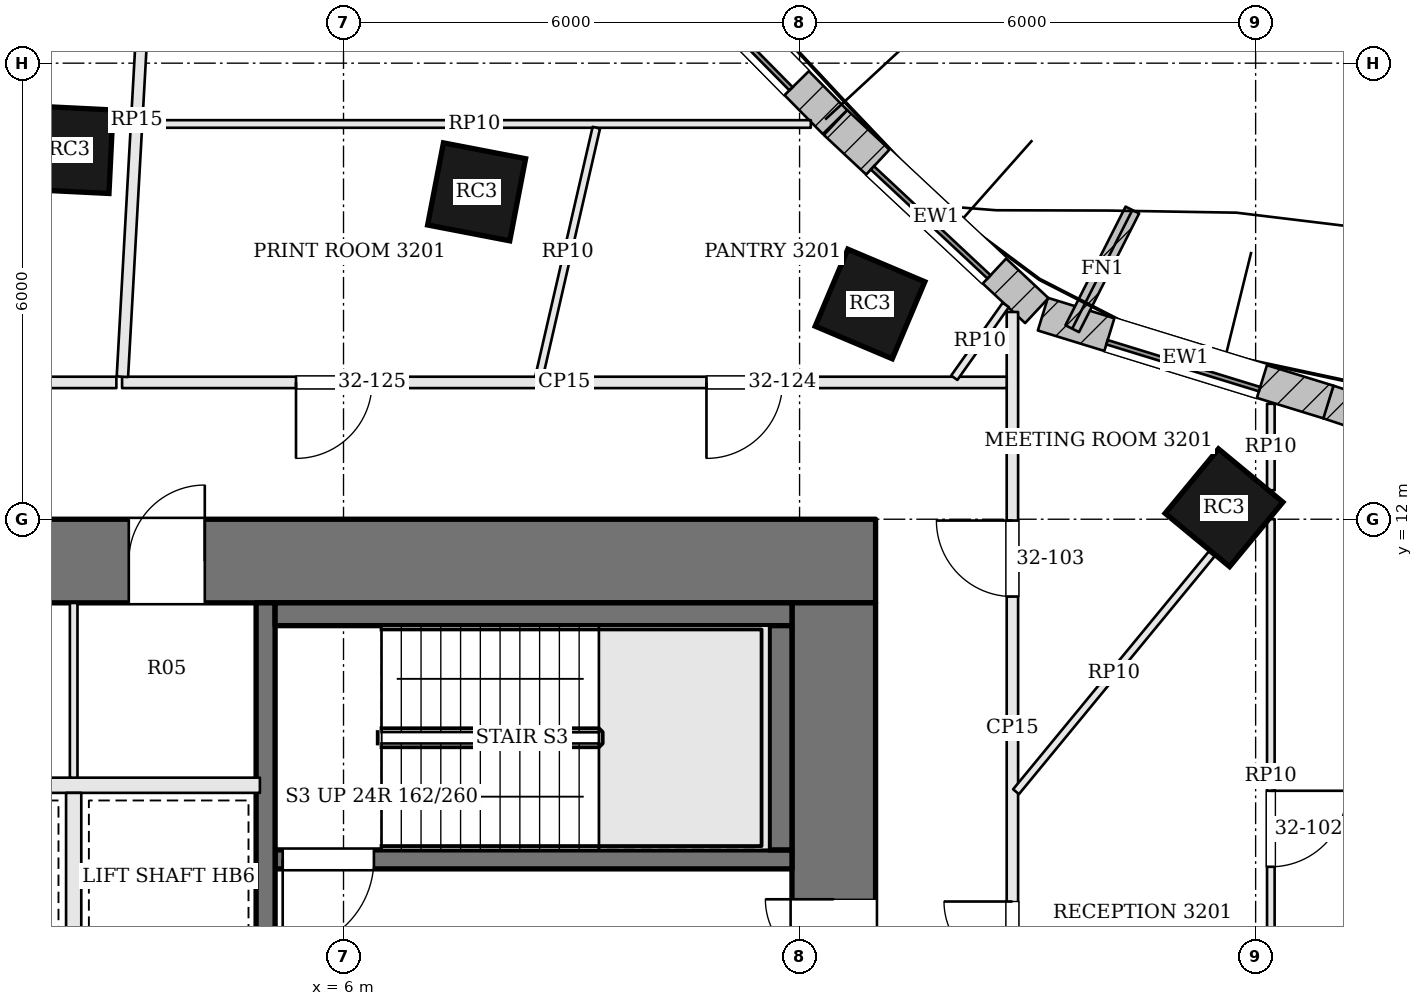
"""IFC4 building model, lengths in metres.
Left out: names, types, materials, properties, quantities, classifications, styles, units other than length and angle.
Written with IfcOpenShell. Run it as: python <this file> out.ifc"""

import sys

from ifc_helpers import new_model, si_unit, direction, frame, frame_2d, origin, origin_2d, place, context, subcontext, project, spatial, rectangle, extrude, element, fill, save


model = new_model("IFC4")
c1 = context("Model", 3, precision=1e-05, world=origin(), true_north=direction((0.0, 1.0)))
c2 = subcontext(c1, "Body", "Model", "MODEL_VIEW")
j1 = project(units=[si_unit("LENGTHUNIT", "METRE"), si_unit("PLANEANGLEUNIT", "RADIAN")], contexts=[c1])
p1 = place(None, origin())
s1 = spatial("IfcSite", under=j1, at=p1, CompositionType="ELEMENT")
p2 = place(p1, origin())
s2 = spatial("IfcBuilding", under=s1, at=p2, CompositionType="ELEMENT")
p3 = place(p2, frame((0.0, 0.0, 134.4)))
s3 = spatial("IfcBuildingStorey", under=s2, at=p3, CompositionType="ELEMENT", Elevation=134.4)
p4 = place(p3, frame((-13.0, 11.45, 0.0), z_axis=(0.0, 0.0, 1.0), x_axis=(1.0, 0.0, 0.0)))
e1 = element("IfcWall", 1, at=p4, inside=s3, PredefinedType="SHEAR", context=c2, shape_type="SweptSolid", body=[
    extrude(rectangle(XDim=26.0, YDim=1.1, at=frame_2d((13.0, 0.0))), origin(), (0.0, 0.0, 1.0), 3.9),
])
p5 = place(p4, frame((8.975, 0.0, 0.0)))
e2 = element("IfcOpeningElement", 2, at=p5, cuts=e1, PredefinedType="OPENING", context=c2, shape_type="SweptSolid", body=[
    extrude(rectangle(XDim=0.7, YDim=2.1, at=frame_2d((0.35, 1.05))), frame((0.0, 0.56, 0.0), z_axis=(0.0, -1.0, 0.0), x_axis=(1.0, 0.0, 0.0)), (0.0, 0.0, 1.0), 1.12),
])
p6 = place(p4, frame((11.425, 0.0, 0.0)))
e3 = element("IfcOpeningElement", 3, at=p6, cuts=e1, PredefinedType="OPENING", context=c2, shape_type="SweptSolid", body=[
    extrude(rectangle(XDim=0.7, YDim=2.1, at=frame_2d((0.35, 1.05))), frame((0.0, 0.56, 0.0), z_axis=(0.0, -1.0, 0.0), x_axis=(1.0, 0.0, 0.0)), (0.0, 0.0, 1.0), 1.12),
])
p7 = place(p4, frame((13.725, 0.0, 0.0)))
e4 = element("IfcOpeningElement", 4, at=p7, cuts=e1, PredefinedType="OPENING", context=c2, shape_type="SweptSolid", body=[
    extrude(rectangle(XDim=1.0, YDim=2.1, at=frame_2d((0.5, 1.05))), frame((0.0, 0.56, 0.0), z_axis=(0.0, -1.0, 0.0), x_axis=(1.0, 0.0, 0.0)), (0.0, 0.0, 1.0), 1.12),
])
p8 = place(p4, frame((16.175, 0.0, 0.0)))
e5 = element("IfcOpeningElement", 5, at=p8, cuts=e1, PredefinedType="OPENING", context=c2, shape_type="SweptSolid", body=[
    extrude(rectangle(XDim=1.0, YDim=2.1, at=frame_2d((0.5, 1.05))), frame((0.0, 0.56, 0.0), z_axis=(0.0, -1.0, 0.0), x_axis=(1.0, 0.0, 0.0)), (0.0, 0.0, 1.0), 1.12),
])
p9 = place(p3, frame((12.45, -1.9, 0.0), z_axis=(0.0, 0.0, 1.0), x_axis=(0.0, 1.0, 0.0)))
e6 = element("IfcWall", 6, at=p9, inside=s3, PredefinedType="SHEAR", context=c2, shape_type="SweptSolid", body=[
    extrude(rectangle(XDim=12.8, YDim=1.1, at=frame_2d((6.4, 0.0))), origin(), (0.0, 0.0, 1.0), 3.9),
])
p10 = place(p9, frame((7.1, 0.0, 0.0)))
e7 = element("IfcOpeningElement", 7, at=p10, cuts=e6, PredefinedType="OPENING", context=c2, shape_type="SweptSolid", body=[
    extrude(rectangle(XDim=1.8, YDim=2.1, at=frame_2d((0.9, 1.05))), frame((0.0, 0.56, 0.0), z_axis=(0.0, -1.0, 0.0), x_axis=(1.0, 0.0, 0.0)), (0.0, 0.0, 1.0), 1.12),
])
for number, where, z_axis, x_axis in (
    (8, (17.584, 12.151, 0.0), (0.0, 0.0, 1.0), (-0.771, 0.637, 0.0)),
    (9, (12.927, 14.832, 0.0), (0.0, 0.0, 1.0), (-0.921, 0.389, 0.0)),
    (10, (7.751, 16.307, 0.0), (0.0, 0.0, 1.0), (-0.982, 0.189, 0.0)),
    (11, (2.392, 16.862, 0.0), (0.0, 0.0, 1.0), (-0.999, 0.049, 0.0)),
):
    element("IfcColumn", number, at=place(p3, frame(where, z_axis=z_axis, x_axis=x_axis)), inside=s3, PredefinedType="COLUMN", context=c2, shape_type="SweptSolid", body=[
        extrude(rectangle(XDim=1.1, YDim=1.1, at=origin_2d()), origin(), (0.0, 0.0, 1.0), 3.9),
    ])
p11 = place(p3, frame((23.77, 11.938, 0.0), z_axis=(0.0, 0.0, 1.0), x_axis=(-0.948673679101, 0.316256621402, 0.0)))
e12 = element("IfcWall", 12, at=p11, inside=s3, PredefinedType="SOLIDWALL", context=c2, shape_type="SweptSolid", body=[
    extrude(rectangle(XDim=5.076, YDim=0.45, at=frame_2d((2.538, 0.0))), origin(), (0.0, 0.0, 1.0), 3.7),
])
p12 = place(p11, frame((1.488, 0.0, 0.9)))
e13 = element("IfcOpeningElement", 13, at=p12, cuts=e12, PredefinedType="OPENING", context=c2, shape_type="SweptSolid", body=[
    extrude(rectangle(XDim=2.1, YDim=2.3, at=frame_2d((1.05, 1.15))), frame((0.0, 0.235, 0.0), z_axis=(0.0, -1.0, 0.0), x_axis=(1.0, 0.0, 0.0)), (0.0, 0.0, 1.0), 0.47),
])
p13 = place(p3, frame((18.958, 13.542, 0.0), z_axis=(0.0, 0.0, 1.0), x_axis=(-0.955792437529, 0.294042201668, 0.0)))
e14 = element("IfcWall", 14, at=p13, inside=s3, PredefinedType="SOLIDWALL", context=c2, shape_type="SweptSolid", body=[
    extrude(rectangle(XDim=3.931, YDim=0.45, at=frame_2d((1.965, 0.0))), origin(), (0.0, 0.0, 1.0), 3.7),
])
p14 = place(p13, frame((0.915, 0.0, 0.9)))
e15 = element("IfcOpeningElement", 15, at=p14, cuts=e14, PredefinedType="OPENING", context=c2, shape_type="SweptSolid", body=[
    extrude(rectangle(XDim=2.1, YDim=2.3, at=frame_2d((1.05, 1.15))), frame((0.0, 0.235, 0.0), z_axis=(0.0, -1.0, 0.0), x_axis=(1.0, 0.0, 0.0)), (0.0, 0.0, 1.0), 0.47),
])
p15 = place(p3, frame((15.121, 14.745, 0.0), z_axis=(0.0, 0.0, 1.0), x_axis=(-0.730618259172, 0.68278617397, 0.0)))
e16 = element("IfcWall", 16, at=p15, inside=s3, PredefinedType="SOLIDWALL", context=c2, shape_type="SweptSolid", body=[
    extrude(rectangle(XDim=3.624, YDim=0.45, at=frame_2d((1.812, 0.0))), origin(), (0.0, 0.0, 1.0), 3.7),
])
p16 = place(p15, frame((0.762, 0.0, 0.9)))
e17 = element("IfcOpeningElement", 17, at=p16, cuts=e16, PredefinedType="OPENING", context=c2, shape_type="SweptSolid", body=[
    extrude(rectangle(XDim=2.1, YDim=2.3, at=frame_2d((1.05, 1.15))), frame((0.0, 0.235, 0.0), z_axis=(0.0, -1.0, 0.0), x_axis=(1.0, 0.0, 0.0)), (0.0, 0.0, 1.0), 0.47),
])
p17 = place(p3, frame((12.466, 17.226, 0.0), z_axis=(0.0, 0.0, 1.0), x_axis=(-0.701875966769, 0.712299183821, 0.0)))
e18 = element("IfcWall", 18, at=p17, inside=s3, PredefinedType="SOLIDWALL", context=c2, shape_type="SweptSolid", body=[
    extrude(rectangle(XDim=3.537, YDim=0.45, at=frame_2d((1.769, 0.0))), origin(), (0.0, 0.0, 1.0), 3.7),
])
p18 = place(p17, frame((0.718, 0.0, 0.9)))
e19 = element("IfcOpeningElement", 19, at=p18, cuts=e18, PredefinedType="OPENING", context=c2, shape_type="SweptSolid", body=[
    extrude(rectangle(XDim=2.1, YDim=2.3, at=frame_2d((1.05, 1.15))), frame((0.0, 0.235, 0.0), z_axis=(0.0, -1.0, 0.0), x_axis=(1.0, 0.0, 0.0)), (0.0, 0.0, 1.0), 0.47),
])
p19 = place(p3, frame((15.587, 14.507, 0.0), z_axis=(0.0, 0.0, 1.0), x_axis=(0.452117231361, 0.89195852432, 0.0)))
e20 = element("IfcWall", 20, at=p19, inside=s3, PredefinedType="SOLIDWALL", context=c2, shape_type="SweptSolid", body=[
    extrude(rectangle(XDim=1.75, YDim=0.2, at=frame_2d((0.875, 0.0))), origin(), (0.0, 0.0, 1.0), 3.7),
])
p20 = place(p3, frame((11.9, 7.525, 0.0), z_axis=(0.0, 0.0, 1.0), x_axis=(-1.0, 0.0, 0.0)))
e21 = element("IfcWall", 21, at=p20, inside=s3, PredefinedType="SOLIDWALL", context=c2, shape_type="SweptSolid", body=[
    extrude(rectangle(XDim=6.8, YDim=0.25, at=frame_2d((3.4, 0.0))), origin(), (0.0, 0.0, 1.0), 3.7),
])
p21 = place(p20, frame((5.5, 0.0, 0.0)))
e22 = element("IfcOpeningElement", 22, at=p21, cuts=e21, PredefinedType="OPENING", context=c2, shape_type="SweptSolid", body=[
    extrude(rectangle(XDim=1.2, YDim=2.1, at=frame_2d((0.6, 1.05))), frame((0.0, 0.135, 0.0), z_axis=(0.0, -1.0, 0.0), x_axis=(1.0, 0.0, 0.0)), (0.0, 0.0, 1.0), 0.27),
])
p22 = place(p3, frame((4.975, 10.9, 0.0), z_axis=(0.0, 0.0, 1.0), x_axis=(0.0, -1.0, 0.0)))
e23 = element("IfcWall", 23, at=p22, inside=s3, PredefinedType="SOLIDWALL", context=c2, shape_type="SweptSolid", body=[
    extrude(rectangle(XDim=12.8, YDim=0.25, at=frame_2d((6.4, 0.0))), origin(), (0.0, 0.0, 1.0), 3.7),
])
p23 = place(p22, frame((4.95, 0.0, 0.0)))
e24 = element("IfcOpeningElement", 24, at=p23, cuts=e23, PredefinedType="OPENING", context=c2, shape_type="SweptSolid", body=[
    extrude(rectangle(XDim=1.2, YDim=2.1, at=frame_2d((0.6, 1.05))), frame((0.0, 0.135, 0.0), z_axis=(0.0, -1.0, 0.0), x_axis=(1.0, 0.0, 0.0)), (0.0, 0.0, 1.0), 0.27),
])
p24 = place(p3, frame((11.9, 10.75, 0.0), z_axis=(0.0, 0.0, 1.0), x_axis=(-1.0, 0.0, 0.0)))
e25 = element("IfcWall", 25, at=p24, inside=s3, PredefinedType="SOLIDWALL", context=c2, shape_type="SweptSolid", body=[
    extrude(rectangle(XDim=6.8, YDim=0.3, at=frame_2d((3.4, 0.0))), origin(), (0.0, 0.0, 1.0), 3.7),
])
p25 = place(p3, frame((11.75, 10.6, 0.0), z_axis=(0.0, 0.0, 1.0), x_axis=(0.0, -1.0, 0.0)))
e26 = element("IfcWall", 26, at=p25, inside=s3, PredefinedType="SOLIDWALL", context=c2, shape_type="SweptSolid", body=[
    extrude(rectangle(XDim=2.95, YDim=0.3, at=frame_2d((1.475, 0.0))), origin(), (0.0, 0.0, 1.0), 3.7),
])
p26 = place(p3, frame((-4.9, 8.5, 0.0), z_axis=(0.0, 0.0, 1.0), x_axis=(1.0, 0.0, 0.0)))
e27 = element("IfcWall", 27, at=p26, inside=s3, PredefinedType="SOLIDWALL", context=c2, shape_type="SweptSolid", body=[
    extrude(rectangle(XDim=9.8, YDim=0.2, at=frame_2d((4.9, 0.0))), origin(), (0.0, 0.0, 1.0), 3.7),
])
p27 = place(p3, frame((2.45, 6.2, 0.0), z_axis=(0.0, 0.0, 1.0), x_axis=(0.0, 1.0, 0.0)))
e28 = element("IfcWall", 28, at=p27, inside=s3, PredefinedType="SOLIDWALL", context=c2, shape_type="SweptSolid", body=[
    extrude(rectangle(XDim=2.2, YDim=0.2, at=frame_2d((1.1, 0.0))), origin(), (0.0, 0.0, 1.0), 3.7),
])
p28 = place(p3, frame((2.45, 8.6, 0.0), z_axis=(0.0, 0.0, 1.0), x_axis=(0.0, 1.0, 0.0)))
e29 = element("IfcWall", 29, at=p28, inside=s3, PredefinedType="PARTITIONING", context=c2, shape_type="SweptSolid", body=[
    extrude(rectangle(XDim=2.3, YDim=0.1, at=frame_2d((1.15, 0.0))), origin(), (0.0, 0.0, 1.0), 3.7),
])
p29 = place(p3, frame((14.8, 3.784, 0.0), z_axis=(0.0, 0.0, 1.0), x_axis=(0.0, 1.0, 0.0)))
e30 = element("IfcWall", 30, at=p29, inside=s3, PredefinedType="PARTITIONING", context=c2, shape_type="SweptSolid", body=[
    extrude(rectangle(XDim=10.943, YDim=0.15, at=frame_2d((5.472, 0.0))), origin(), (0.0, 0.0, 1.0), 3.198),
])
p30 = place(p29, frame((1.387, 0.0, 0.0)))
e31 = element("IfcOpeningElement", 31, at=p30, cuts=e30, PredefinedType="OPENING", context=c2, shape_type="SweptSolid", body=[
    extrude(rectangle(XDim=1.8, YDim=2.1, at=frame_2d((0.9, 1.05))), frame((0.0, 0.085, 0.0), z_axis=(0.0, -1.0, 0.0), x_axis=(1.0, 0.0, 0.0)), (0.0, 0.0, 1.0), 0.17),
])
p31 = place(p29, frame((7.199, 0.0, 0.0)))
e32 = element("IfcOpeningElement", 32, at=p31, cuts=e30, PredefinedType="OPENING", context=c2, shape_type="SweptSolid", body=[
    extrude(rectangle(XDim=1.0, YDim=2.4, at=frame_2d((0.5, 1.2))), frame((0.0, 0.085, 0.0), z_axis=(0.0, -1.0, 0.0), x_axis=(1.0, 0.0, 0.0)), (0.0, 0.0, 1.0), 0.17),
])
p32 = place(p3, frame((14.725, 13.8, 0.0), z_axis=(0.0, 0.0, 1.0), x_axis=(-1.0, 0.0, 0.0)))
e33 = element("IfcWall", 33, at=p32, inside=s3, PredefinedType="PARTITIONING", context=c2, shape_type="SweptSolid", body=[
    extrude(rectangle(XDim=11.638, YDim=0.15, at=frame_2d((5.819, 0.0))), origin(), (0.0, 0.0, 1.0), 3.198),
])
p33 = place(p32, frame((2.95, 0.0, 0.0)))
e34 = element("IfcOpeningElement", 34, at=p33, cuts=e33, PredefinedType="OPENING", context=c2, shape_type="SweptSolid", body=[
    extrude(rectangle(XDim=1.0, YDim=2.1, at=frame_2d((0.5, 1.05))), frame((0.0, 0.085, 0.0), z_axis=(0.0, -1.0, 0.0), x_axis=(1.0, 0.0, 0.0)), (0.0, 0.0, 1.0), 0.17),
])
p34 = place(p32, frame((8.35, 0.0, 0.0)))
e35 = element("IfcOpeningElement", 35, at=p34, cuts=e33, PredefinedType="OPENING", context=c2, shape_type="SweptSolid", body=[
    extrude(rectangle(XDim=1.0, YDim=2.1, at=frame_2d((0.5, 1.05))), frame((0.0, 0.085, 0.0), z_axis=(0.0, -1.0, 0.0), x_axis=(1.0, 0.0, 0.0)), (0.0, 0.0, 1.0), 0.17),
])
p35 = place(p3, frame((25.739, 8.408, 0.0), z_axis=(0.0, 0.0, 1.0), x_axis=(-0.921062306608, -0.389415237692, 0.0)))
e36 = element("IfcWall", 36, at=p35, inside=s3, PredefinedType="PARTITIONING", context=c2, shape_type="SweptSolid", body=[
    extrude(rectangle(XDim=11.801, YDim=0.15, at=frame_2d((5.9, 0.0))), origin(), (0.0, 0.0, 1.0), 3.198),
])
p36 = place(p3, frame((3.47, 20.638, 0.0), z_axis=(0.0, 0.0, 1.0), x_axis=(-0.056008975247, -0.998430265312, 0.0)))
e37 = element("IfcWall", 37, at=p36, inside=s3, PredefinedType="PARTITIONING", context=c2, shape_type="SweptSolid", body=[
    extrude(rectangle(XDim=6.774, YDim=0.15, at=frame_2d((3.387, 0.0))), origin(), (0.0, 0.0, 1.0), 3.198),
])
p37 = place(p3, frame((3.012, 13.8, 0.0), z_axis=(0.0, 0.0, 1.0), x_axis=(-1.0, 0.0, 0.0)))
e38 = element("IfcWall", 38, at=p37, inside=s3, PredefinedType="PARTITIONING", context=c2, shape_type="SweptSolid", body=[
    extrude(rectangle(XDim=17.812, YDim=0.15, at=frame_2d((8.906, 0.0))), origin(), (0.0, 0.0, 1.0), 3.198),
])
p38 = place(p37, frame((3.342, 0.0, 0.0)))
e39 = element("IfcOpeningElement", 39, at=p38, cuts=e38, PredefinedType="OPENING", context=c2, shape_type="SweptSolid", body=[
    extrude(rectangle(XDim=1.8, YDim=2.1, at=frame_2d((0.9, 1.05))), frame((0.0, 0.085, 0.0), z_axis=(0.0, -1.0, 0.0), x_axis=(1.0, 0.0, 0.0)), (0.0, 0.0, 1.0), 0.17),
])
p39 = place(p37, frame((9.659, 0.0, 0.0)))
e40 = element("IfcOpeningElement", 40, at=p39, cuts=e38, PredefinedType="OPENING", context=c2, shape_type="SweptSolid", body=[
    extrude(rectangle(XDim=1.0, YDim=2.4, at=frame_2d((0.5, 1.2))), frame((0.0, 0.085, 0.0), z_axis=(0.0, -1.0, 0.0), x_axis=(1.0, 0.0, 0.0)), (0.0, 0.0, 1.0), 0.17),
])
p40 = place(p37, frame((14.25, 0.0, 0.0)))
e41 = element("IfcOpeningElement", 41, at=p40, cuts=e38, PredefinedType="OPENING", context=c2, shape_type="SweptSolid", body=[
    extrude(rectangle(XDim=1.0, YDim=2.1, at=frame_2d((0.5, 1.05))), frame((0.0, 0.085, 0.0), z_axis=(0.0, -1.0, 0.0), x_axis=(1.0, 0.0, 0.0)), (0.0, 0.0, 1.0), 0.17),
])
p41 = place(p3, frame((3.298, 17.2, 0.0), z_axis=(0.0, 0.0, 1.0), x_axis=(1.0, 0.0, 0.0)))
e42 = element("IfcWall", 42, at=p41, inside=s3, PredefinedType="PARTITIONING", context=c2, shape_type="SweptSolid", body=[
    extrude(rectangle(XDim=8.85, YDim=0.1, at=frame_2d((4.425, 0.0))), origin(), (0.0, 0.0, 1.0), 3.184),
])
p42 = place(p3, frame((18.2, 13.519, 0.0), z_axis=(0.0, 0.0, 1.0), x_axis=(0.0, -1.0, 0.0)))
e43 = element("IfcWall", 43, at=p42, inside=s3, PredefinedType="PARTITIONING", context=c2, shape_type="SweptSolid", body=[
    extrude(rectangle(XDim=1.138, YDim=0.1, at=frame_2d((0.569, 0.0))), origin(), (0.0, 0.0, 1.0), 3.184),
])
p43 = place(p3, frame((18.2, 12.001, 0.0), z_axis=(0.0, 0.0, 1.0), x_axis=(0.0, -1.0, 0.0)))
e44 = element("IfcWall", 44, at=p43, inside=s3, PredefinedType="PARTITIONING", context=c2, shape_type="SweptSolid", body=[
    extrude(rectangle(XDim=6.759, YDim=0.1, at=frame_2d((3.379, 0.0))), origin(), (0.0, 0.0, 1.0), 3.184),
])
p44 = place(p43, frame((3.574, 0.0, 0.0)))
e45 = element("IfcOpeningElement", 45, at=p44, cuts=e44, PredefinedType="OPENING", context=c2, shape_type="SweptSolid", body=[
    extrude(rectangle(XDim=1.0, YDim=2.1, at=frame_2d((0.5, 1.05))), frame((0.0, 0.06, 0.0), z_axis=(0.0, -1.0, 0.0), x_axis=(1.0, 0.0, 0.0)), (0.0, 0.0, 1.0), 0.12),
])
p45 = place(p3, frame((14.848, 8.415, 0.0), z_axis=(0.0, 0.0, 1.0), x_axis=(0.63542004032, 0.77216667395, 0.0)))
e46 = element("IfcWall", 46, at=p45, inside=s3, PredefinedType="PARTITIONING", context=c2, shape_type="SweptSolid", body=[
    extrude(rectangle(XDim=4.053, YDim=0.1, at=frame_2d((2.026, 0.0))), origin(), (0.0, 0.0, 1.0), 3.184),
])
p46 = place(p3, frame((14.035, 13.861, 0.0), z_axis=(0.0, 0.0, 1.0), x_axis=(0.57745118401, 0.816425214019, 0.0)))
e47 = element("IfcWall", 47, at=p46, inside=s3, PredefinedType="PARTITIONING", context=c2, shape_type="SweptSolid", body=[
    extrude(rectangle(XDim=1.173, YDim=0.1, at=frame_2d((0.586, 0.0))), origin(), (0.0, 0.0, 1.0), 3.184),
])
p47 = place(p3, frame((8.573, 13.873, 0.0), z_axis=(0.0, 0.0, 1.0), x_axis=(0.224048430302, 0.974578011695, 0.0)))
e48 = element("IfcWall", 48, at=p47, inside=s3, PredefinedType="PARTITIONING", context=c2, shape_type="SweptSolid", body=[
    extrude(rectangle(XDim=3.364, YDim=0.1, at=frame_2d((1.682, 0.0))), origin(), (0.0, 0.0, 1.0), 3.184),
])
p48 = place(p14, origin())
e49 = element("IfcWindow", 49, at=p48, inside=s3, PartitioningType="SINGLE_PANEL", PredefinedType="WINDOW", context=c2, shape_type="SweptSolid", body=[
    extrude(rectangle(XDim=2.1, YDim=2.3, at=frame_2d((1.05, 1.15))), frame((0.0, 0.135, 0.0), z_axis=(0.0, -1.0, 0.0), x_axis=(1.0, 0.0, 0.0)), (0.0, 0.0, 1.0), 0.06),
])
fill(e15, e49)
p49 = place(p16, origin())
e50 = element("IfcWindow", 50, at=p49, inside=s3, PartitioningType="SINGLE_PANEL", PredefinedType="WINDOW", context=c2, shape_type="SweptSolid", body=[
    extrude(rectangle(XDim=2.1, YDim=2.3, at=frame_2d((1.05, 1.15))), frame((0.0, 0.135, 0.0), z_axis=(0.0, -1.0, 0.0), x_axis=(1.0, 0.0, 0.0)), (0.0, 0.0, 1.0), 0.06),
])
fill(e17, e50)
p50 = place(p18, origin())
e51 = element("IfcWindow", 51, at=p50, inside=s3, PartitioningType="SINGLE_PANEL", PredefinedType="WINDOW", context=c2, shape_type="SweptSolid", body=[
    extrude(rectangle(XDim=2.1, YDim=2.3, at=frame_2d((1.05, 1.15))), frame((0.0, 0.135, 0.0), z_axis=(0.0, -1.0, 0.0), x_axis=(1.0, 0.0, 0.0)), (0.0, 0.0, 1.0), 0.06),
])
fill(e19, e51)
p51 = place(p10, origin())
e52 = element("IfcDoor", 52, at=p51, inside=s3, OperationType="DOUBLE_DOOR_SINGLE_SWING", PredefinedType="DOOR", context=c2, shape_type="SweptSolid", body=[
    extrude(rectangle(XDim=1.8, YDim=2.1, at=frame_2d((0.9, 1.05))), frame((0.0, 0.025, 0.0), z_axis=(0.0, -1.0, 0.0), x_axis=(1.0, 0.0, 0.0)), (0.0, 0.0, 1.0), 0.05),
])
fill(e7, e52)
p52 = place(p21, origin())
e53 = element("IfcDoor", 53, at=p52, inside=s3, OperationType="SINGLE_SWING_RIGHT", PredefinedType="DOOR", context=c2, shape_type="SweptSolid", body=[
    extrude(rectangle(XDim=1.2, YDim=2.1, at=frame_2d((0.6, 1.05))), frame((0.0, 0.025, 0.0), z_axis=(0.0, -1.0, 0.0), x_axis=(1.0, 0.0, 0.0)), (0.0, 0.0, 1.0), 0.05),
])
fill(e22, e53)
p53 = place(p8, origin())
e54 = element("IfcDoor", 54, at=p53, inside=s3, OperationType="SINGLE_SWING_RIGHT", PredefinedType="DOOR", context=c2, shape_type="SweptSolid", body=[
    extrude(rectangle(XDim=1.0, YDim=2.1, at=frame_2d((0.5, 1.05))), frame((0.0, 0.025, 0.0), z_axis=(0.0, -1.0, 0.0), x_axis=(1.0, 0.0, 0.0)), (0.0, 0.0, 1.0), 0.05),
])
fill(e5, e54)
p54 = place(p30, origin())
e55 = element("IfcDoor", 55, at=p54, inside=s3, OperationType="DOUBLE_DOOR_SINGLE_SWING", PredefinedType="DOOR", context=c2, shape_type="SweptSolid", body=[
    extrude(rectangle(XDim=1.8, YDim=2.1, at=frame_2d((0.9, 1.05))), frame((0.0, 0.025, 0.0), z_axis=(0.0, -1.0, 0.0), x_axis=(1.0, 0.0, 0.0)), (0.0, 0.0, 1.0), 0.05),
])
fill(e31, e55)
p55 = place(p44, origin())
e56 = element("IfcDoor", 56, at=p55, inside=s3, OperationType="SINGLE_SWING_LEFT", PredefinedType="DOOR", context=c2, shape_type="SweptSolid", body=[
    extrude(rectangle(XDim=1.0, YDim=2.1, at=frame_2d((0.5, 1.05))), frame((0.0, 0.025, 0.0), z_axis=(0.0, -1.0, 0.0), x_axis=(1.0, 0.0, 0.0)), (0.0, 0.0, 1.0), 0.05),
])
fill(e45, e56)
p56 = place(p31, origin())
e57 = element("IfcDoor", 57, at=p56, inside=s3, OperationType="SINGLE_SWING_RIGHT", PredefinedType="DOOR", context=c2, shape_type="SweptSolid", body=[
    extrude(rectangle(XDim=1.0, YDim=2.4, at=frame_2d((0.5, 1.2))), frame((0.0, 0.025, 0.0), z_axis=(0.0, -1.0, 0.0), x_axis=(1.0, 0.0, 0.0)), (0.0, 0.0, 1.0), 0.05),
])
fill(e32, e57)
p57 = place(p33, origin())
e58 = element("IfcDoor", 58, at=p57, inside=s3, OperationType="SINGLE_SWING_RIGHT", PredefinedType="DOOR", context=c2, shape_type="SweptSolid", body=[
    extrude(rectangle(XDim=1.0, YDim=2.1, at=frame_2d((0.5, 1.05))), frame((0.0, 0.025, 0.0), z_axis=(0.0, -1.0, 0.0), x_axis=(1.0, 0.0, 0.0)), (0.0, 0.0, 1.0), 0.05),
])
fill(e34, e58)
p58 = place(p34, origin())
e59 = element("IfcDoor", 59, at=p58, inside=s3, OperationType="SINGLE_SWING_RIGHT", PredefinedType="DOOR", context=c2, shape_type="SweptSolid", body=[
    extrude(rectangle(XDim=1.0, YDim=2.1, at=frame_2d((0.5, 1.05))), frame((0.0, 0.025, 0.0), z_axis=(0.0, -1.0, 0.0), x_axis=(1.0, 0.0, 0.0)), (0.0, 0.0, 1.0), 0.05),
])
fill(e35, e59)
save(model, sys.argv[1])
